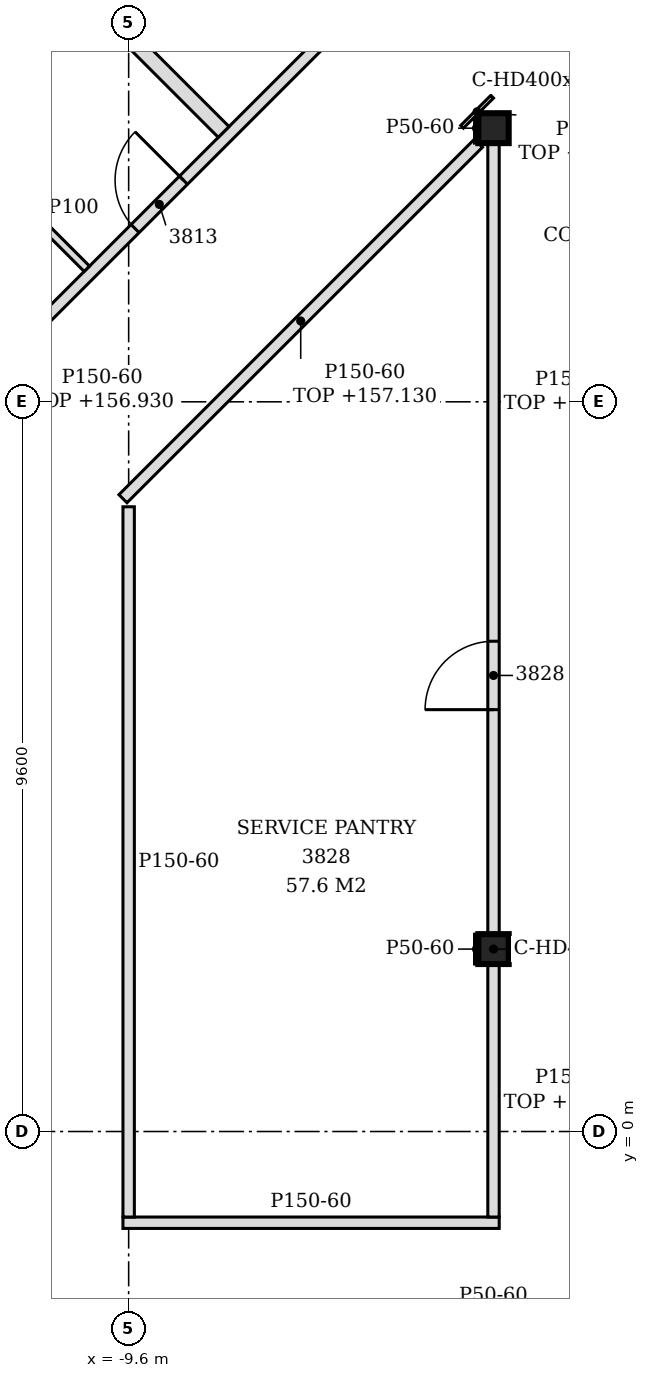
"""IFC4 building model, lengths in metres.
Left out: names, types, materials, properties, quantities, classifications, styles, units other than length and angle.
Written with IfcOpenShell. Run it as: python <this file> out.ifc"""

import sys

from ifc_helpers import new_model, si_unit, direction, frame, frame_2d, origin, origin_2d, place, context, subcontext, project, spatial, polyline, rectangle, i_section, outline, extrude, element, fill, save


model = new_model("IFC4")
c1 = context("Model", 3, precision=1e-05, world=origin(), true_north=direction((0.0, 1.0)))
c2 = subcontext(c1, "Body", "Model", "MODEL_VIEW")
j1 = project(units=[si_unit("LENGTHUNIT", "METRE"), si_unit("PLANEANGLEUNIT", "RADIAN")], contexts=[c1])
p1 = place(None, origin())
s1 = spatial("IfcSite", under=j1, at=p1, CompositionType="ELEMENT")
p2 = place(p1, origin())
s2 = spatial("IfcBuilding", under=s1, at=p2, CompositionType="ELEMENT")
p3 = place(p2, frame((0.0, 0.0, 154.2)))
s3 = spatial("IfcBuildingStorey", under=s2, at=p3, CompositionType="ELEMENT", Elevation=154.2)
for number, where, z_axis, x_axis in (
    (1, (-4.8, 2.4, -0.15), (0.0, 0.0, 1.0), (1.0, 0.0, 0.0)),
    (2, (-4.8, 13.2, -0.15), (0.0, 0.0, 1.0), (1.0, 0.0, 0.0)),
):
    element("IfcColumn", number, at=place(p3, frame(where, z_axis=z_axis, x_axis=x_axis)), inside=s3, PredefinedType="COLUMN", context=c2, shape_type="SweptSolid", body=[
        extrude(i_section(OverallWidth=0.399, OverallDepth=0.393, WebThickness=0.023, FlangeThickness=0.037, FilletRadius=0.015, at=origin_2d()), origin(), (0.0, 0.0, 1.0), 3.6),
    ])
p4 = place(p3, frame((-9.675, -1.2, 0.0), z_axis=(0.0, 0.0, 1.0), x_axis=(1.0, 0.0, 0.0)))
e3 = element("IfcWall", 3, at=p4, inside=s3, PredefinedType="PARTITIONING", context=c2, shape_type="SweptSolid", body=[
    extrude(outline(polyline([(0.0, 0.0), (4.95, 0.0), (4.95, 2.83), (4.725, 2.83), (4.723, 3.45), (0.0, 3.45), (0.0, 0.0)])), frame((0.0, 0.075, 0.0), z_axis=(0.0, -1.0, 0.0), x_axis=(1.0, 0.0, 0.0)), (0.0, 0.0, 1.0), 0.15),
])
p5 = place(p3, frame((-9.6, -1.125, 0.0), z_axis=(0.0, 0.0, 1.0), x_axis=(0.0, 1.0, 0.0)))
e4 = element("IfcWall", 4, at=p5, inside=s3, PredefinedType="PARTITIONING", context=c2, shape_type="SweptSolid", body=[
    extrude(outline(polyline([(0.0, 0.0), (9.344, 0.0), (9.344, 3.45), (6.025, 3.45), (6.023, 2.93), (5.825, 2.93), (5.823, 3.45), (1.225, 3.45), (1.223, 2.93), (1.025, 2.93), (1.023, 3.45), (0.0, 3.45), (0.0, 0.0)])), frame((0.0, 0.075, 0.0), z_axis=(0.0, -1.0, 0.0), x_axis=(1.0, 0.0, 0.0)), (0.0, 0.0, 1.0), 0.15),
])
p6 = place(p3, frame((-4.8, -1.125, 0.0), z_axis=(0.0, 0.0, 1.0), x_axis=(0.0, 1.0, 0.0)))
e5 = element("IfcWall", 5, at=p6, inside=s3, PredefinedType="PARTITIONING", context=c2, shape_type="SweptSolid", body=[
    extrude(rectangle(XDim=3.329, YDim=0.15, at=frame_2d((1.664, 0.0))), origin(), (0.0, 0.0, 1.0), 2.83),
])
p7 = place(p3, frame((-4.8, 2.596, 0.0), z_axis=(0.0, 0.0, 1.0), x_axis=(0.0, 1.0, 0.0)))
e6 = element("IfcWall", 6, at=p7, inside=s3, PredefinedType="PARTITIONING", context=c2, shape_type="SweptSolid", body=[
    extrude(rectangle(XDim=10.407, YDim=0.15, at=frame_2d((5.204, 0.0))), origin(), (0.0, 0.0, 1.0), 2.83),
])
p8 = place(p7, frame((2.954, 0.0, 0.0)))
e7 = element("IfcOpeningElement", 7, at=p8, cuts=e6, PredefinedType="OPENING", context=c2, shape_type="SweptSolid", body=[
    extrude(rectangle(XDim=0.9, YDim=2.1, at=frame_2d((0.45, 1.05))), frame((0.0, 0.085, 0.0), z_axis=(0.0, -1.0, 0.0), x_axis=(1.0, 0.0, 0.0)), (0.0, 0.0, 1.0), 0.17),
])
p9 = place(p3, frame((-9.675, 8.325, 0.0), z_axis=(0.0, 0.0, 1.0), x_axis=(0.707106781187, 0.707106781187, 0.0)))
e8 = element("IfcWall", 8, at=p9, inside=s3, PredefinedType="PARTITIONING", context=c2, shape_type="SweptSolid", body=[
    extrude(rectangle(XDim=6.614, YDim=0.15, at=frame_2d((3.307, 0.0))), origin(), (0.0, 0.0, 1.0), 2.93),
])
p10 = place(p3, frame((-12.075, 9.319, 0.0), z_axis=(0.0, 0.0, 1.0), x_axis=(0.707106781187, 0.707106781187, 0.0)))
e9 = element("IfcWall", 9, at=p10, inside=s3, PredefinedType="PARTITIONING", context=c2, shape_type="SweptSolid", body=[
    extrude(rectangle(XDim=13.793, YDim=0.15, at=frame_2d((6.896, 0.0))), origin(), (0.0, 0.0, 1.0), 2.73),
])
p11 = place(p10, frame((11.692, 0.0, 0.0)))
e10 = element("IfcOpeningElement", 10, at=p11, cuts=e9, PredefinedType="OPENING", context=c2, shape_type="SweptSolid", body=[
    extrude(rectangle(XDim=0.9, YDim=2.1, at=frame_2d((0.45, 1.05))), frame((0.0, 0.085, 0.0), z_axis=(0.0, -1.0, 0.0), x_axis=(1.0, 0.0, 0.0)), (0.0, 0.0, 1.0), 0.17),
])
p12 = place(p10, frame((7.376, 0.0, 0.0)))
e11 = element("IfcOpeningElement", 11, at=p12, cuts=e9, PredefinedType="OPENING", context=c2, shape_type="SweptSolid", body=[
    extrude(rectangle(XDim=0.9, YDim=2.1, at=frame_2d((0.45, 1.05))), frame((0.0, 0.085, 0.0), z_axis=(0.0, -1.0, 0.0), x_axis=(1.0, 0.0, 0.0)), (0.0, 0.0, 1.0), 0.17),
])
p13 = place(p10, frame((3.62, 0.0, 0.0)))
e12 = element("IfcOpeningElement", 12, at=p13, cuts=e9, PredefinedType="OPENING", context=c2, shape_type="SweptSolid", body=[
    extrude(rectangle(XDim=0.9, YDim=2.1, at=frame_2d((0.45, 1.05))), frame((0.0, 0.085, 0.0), z_axis=(0.0, -1.0, 0.0), x_axis=(1.0, 0.0, 0.0)), (0.0, 0.0, 1.0), 0.17),
])
p14 = place(p3, frame((-10.15, 11.35, 0.0), z_axis=(0.0, 0.0, 1.0), x_axis=(-0.707160441348, 0.707053116953, 0.0)))
e13 = element("IfcWall", 13, at=p14, inside=s3, PredefinedType="PARTITIONING", context=c2, shape_type="SweptSolid", body=[
    extrude(rectangle(XDim=2.275, YDim=0.1, at=frame_2d((1.137, 0.0))), origin(), (0.0, 0.0, 1.0), 3.45),
])
p15 = place(p3, frame((-8.35, 13.15, 0.0), z_axis=(0.0, 0.0, 1.0), x_axis=(-0.707092030896, 0.707121531169, 0.0)))
e14 = element("IfcWall", 14, at=p15, inside=s3, PredefinedType="PARTITIONING", context=c2, shape_type="SweptSolid", body=[
    extrude(rectangle(XDim=8.276, YDim=0.2, at=frame_2d((4.138, 0.0))), origin(), (0.0, 0.0, 1.0), 2.93),
])
p16 = place(p3, frame((-5.024, 2.204, 0.0), z_axis=(0.0, 0.0, 1.0), x_axis=(0.0, 1.0, 0.0)))
e15 = element("IfcWall", 15, at=p16, inside=s3, PredefinedType="PARTITIONING", context=c2, shape_type="SweptSolid", body=[
    extrude(rectangle(XDim=0.393, YDim=0.05, at=frame_2d((0.196, 0.0))), origin(), (0.0, 0.0, 1.0), 3.45),
])
p17 = place(p3, frame((-5.024, 13.003, 0.0), z_axis=(0.0, 0.0, 1.0), x_axis=(0.0, 1.0, 0.0)))
e16 = element("IfcWall", 16, at=p17, inside=s3, PredefinedType="PARTITIONING", context=c2, shape_type="SweptSolid", body=[
    extrude(rectangle(XDim=0.393, YDim=0.05, at=frame_2d((0.197, 0.0))), origin(), (0.0, 0.0, 1.0), 3.45),
])
p18 = place(p3, frame((-5.214, 13.218, 0.0), z_axis=(0.0, 0.0, 1.0), x_axis=(0.707106781187, 0.707106781187, 0.0)))
e17 = element("IfcWall", 17, at=p18, inside=s3, PredefinedType="PARTITIONING", context=c2, shape_type="SweptSolid", body=[
    extrude(rectangle(XDim=0.56, YDim=0.05, at=frame_2d((0.28, 0.0))), origin(), (0.0, 0.0, 1.0), 2.73),
])
p19 = place(p13, origin())
e18 = element("IfcDoor", 18, at=p19, inside=s3, OperationType="SINGLE_SWING_RIGHT", PredefinedType="DOOR", context=c2, shape_type="SweptSolid", body=[
    extrude(rectangle(XDim=0.9, YDim=2.1, at=frame_2d((0.45, 1.05))), frame((0.0, 0.025, 0.0), z_axis=(0.0, -1.0, 0.0), x_axis=(1.0, 0.0, 0.0)), (0.0, 0.0, 1.0), 0.05),
])
fill(e12, e18)
p20 = place(p8, origin())
e19 = element("IfcDoor", 19, at=p20, inside=s3, OperationType="SINGLE_SWING_LEFT", PredefinedType="DOOR", context=c2, shape_type="SweptSolid", body=[
    extrude(rectangle(XDim=0.9, YDim=2.1, at=frame_2d((0.45, 1.05))), frame((0.0, 0.025, 0.0), z_axis=(0.0, -1.0, 0.0), x_axis=(1.0, 0.0, 0.0)), (0.0, 0.0, 1.0), 0.05),
])
fill(e7, e19)
save(model, sys.argv[1])
